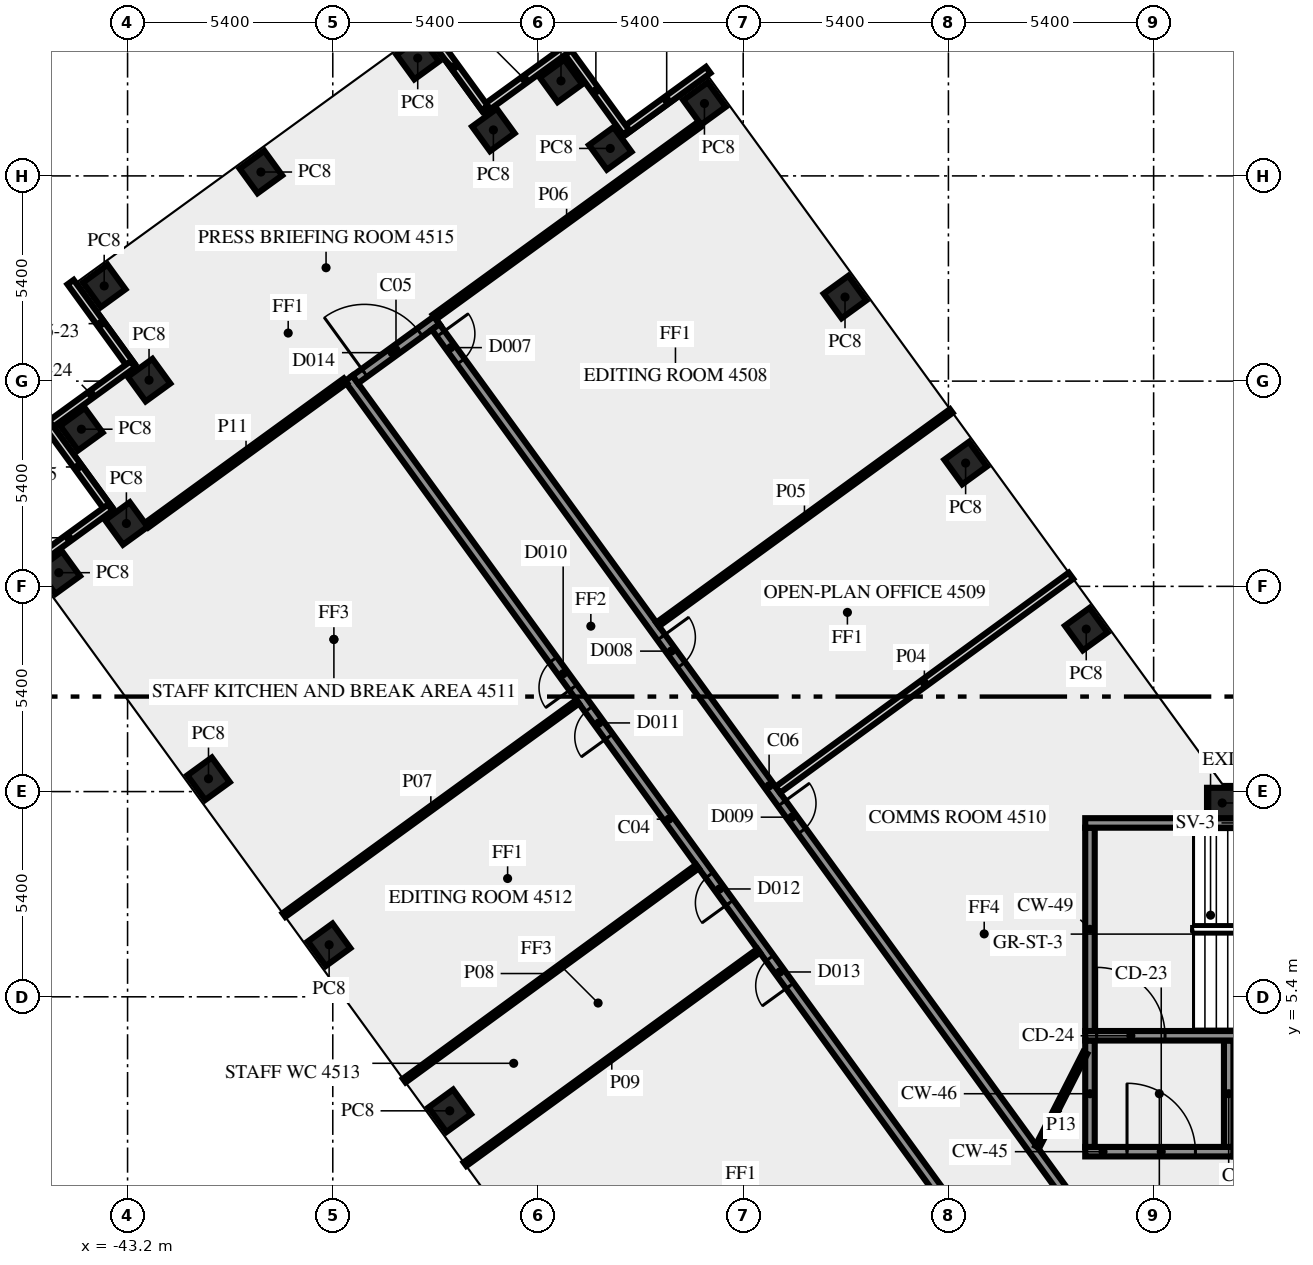
"""IFC4 building model, lengths in metres.
Left out: names, types, materials, properties, quantities, classifications, styles, units other than length and angle.
Written with IfcOpenShell. Run it as: python <this file> out.ifc"""

import sys

from ifc_helpers import new_model, si_unit, direction, frame, frame_2d, origin, origin_2d, place, context, subcontext, project, spatial, rectangle, extrude, element, fill, save


model = new_model("IFC4")
c1 = context("Model", 3, precision=1e-05, world=origin(), true_north=direction((0.0, 1.0)))
c2 = subcontext(c1, "Body", "Model", "MODEL_VIEW")
j1 = project(units=[si_unit("LENGTHUNIT", "METRE"), si_unit("PLANEANGLEUNIT", "RADIAN")], contexts=[c1])
p1 = place(None, origin())
s1 = spatial("IfcSite", under=j1, at=p1, CompositionType="ELEMENT")
p2 = place(p1, origin())
s2 = spatial("IfcBuilding", under=s1, at=p2, CompositionType="ELEMENT")
p3 = place(p2, frame((0.0, 0.0, 194.0)))
s3 = spatial("IfcBuildingStorey", under=s2, at=p3, CompositionType="ELEMENT", Elevation=194.0)
for number, where, z_axis, x_axis in (
    (1, (-17.974, 15.075, 0.0), (0.0, 0.0, 1.0), (-0.588, 0.809, 0.0)),
    (2, (-21.147, 19.444, 0.0), (0.0, 0.0, 1.0), (-0.588, 0.809, 0.0)),
    (3, (-24.321, 23.812, 0.0), (0.0, 0.0, 1.0), (-0.588, 0.809, 0.0)),
    (4, (-28.02, 28.905, 0.0), (0.0, 0.0, 1.0), (-0.809, -0.588, 0.0)),
    (5, (-30.499, 27.723, 0.0), (0.0, 0.0, 1.0), (-0.809, -0.588, 0.0)),
    (6, (-31.795, 29.5, 0.0), (0.0, 0.0, 1.0), (-0.588, 0.809, 0.0)),
    (7, (-33.574, 28.209, 0.0), (0.0, 0.0, 1.0), (-0.588, 0.809, 0.0)),
    (8, (-35.565, 30.1, 0.0), (0.0, 0.0, 1.0), (-0.809, -0.588, 0.0)),
    (9, (-39.691, 27.102, 0.0), (0.0, 0.0, 1.0), (-0.809, -0.588, 0.0)),
    (10, (-43.815, 24.105, 0.0), (0.0, 0.0, 1.0), (-0.809, -0.588, 0.0)),
    (11, (-42.635, 21.626, 0.0), (0.0, 0.0, 1.0), (-0.809, -0.588, 0.0)),
    (12, (-44.415, 20.335, 0.0), (0.0, 0.0, 1.0), (0.588, -0.809, 0.0)),
    (13, (-43.231, 17.854, 0.0), (0.0, 0.0, 1.0), (0.588, -0.809, 0.0)),
    (14, (-45.01, 16.56, 0.0), (0.0, 0.0, 1.0), (0.588, -0.809, 0.0)),
    (15, (-41.07, 11.137, 0.0), (0.0, 0.0, 1.0), (0.588, -0.809, 0.0)),
    (16, (-37.896, 6.769, 0.0), (0.0, 0.0, 1.0), (0.588, -0.809, 0.0)),
    (17, (-34.722, 2.4, 0.0), (0.0, 0.0, 1.0), (0.588, -0.809, 0.0)),
    (18, (-14.395, 10.5, 0.0), (0.0, 0.0, 1.0), (-1.0, 0.0, 0.0)),
):
    element("IfcColumn", number, at=place(p3, frame(where, z_axis=z_axis, x_axis=x_axis)), inside=s3, PredefinedType="COLUMN", context=c2, shape_type="SweptSolid", body=[
        extrude(rectangle(XDim=0.8, YDim=0.8, at=origin_2d()), origin(), (0.0, 0.0, 1.0), 3.65),
    ])
for number, where, z_axis, x_axis in (
    (19, (-27.921, 29.787, 0.0), (0.0, 0.0, 1.0), (-0.809, -0.588, 0.0)),
    (20, (-30.083, 28.149, 0.0), (0.0, 0.0, 1.0), (-0.588, 0.809, 0.0)),
    (21, (-31.654, 30.331, 0.0), (0.0, 0.0, 1.0), (-0.809, -0.588, 0.0)),
    (22, (-33.801, 28.786, 0.0), (0.0, 0.0, 1.0), (-0.588, 0.809, 0.0)),
    (23, (-44.699, 24.205, 0.0), (0.0, 0.0, 1.0), (0.588, -0.809, 0.0)),
    (24, (-43.061, 22.043, 0.0), (0.0, 0.0, 1.0), (-0.809, -0.588, 0.0)),
    (25, (-45.296, 20.434, 0.0), (0.0, 0.0, 1.0), (0.588, -0.809, 0.0)),
    (26, (-43.658, 18.272, 0.0), (0.0, 0.0, 1.0), (-0.809, -0.588, 0.0)),
):
    element("IfcWall", number, at=place(p3, frame(where, z_axis=z_axis, x_axis=x_axis)), inside=s3, PredefinedType="SOLIDWALL", context=c2, shape_type="SweptSolid", body=[
        extrude(rectangle(XDim=2.7, YDim=0.2, at=frame_2d((1.35, 0.0))), origin(), (0.0, 0.0, 1.0), 3.65),
    ])
p4 = place(p3, frame((-18.0, 1.325, 0.0), z_axis=(0.0, 0.0, 1.0), x_axis=(1.0, 0.0, 0.0)))
e27 = element("IfcWall", 27, at=p4, inside=s3, PredefinedType="SHEAR", context=c2, shape_type="SweptSolid", body=[
    extrude(rectangle(XDim=3.9, YDim=0.25, at=frame_2d((1.95, 0.0))), origin(), (0.0, 0.0, 1.0), 3.65),
])
p5 = place(p4, frame((1.1, 0.0, 0.0)))
e28 = element("IfcOpeningElement", 28, at=p5, cuts=e27, PredefinedType="OPENING", context=c2, shape_type="SweptSolid", body=[
    extrude(rectangle(XDim=1.8, YDim=2.1, at=frame_2d((0.9, 1.05))), frame((0.0, 0.135, 0.0), z_axis=(0.0, -1.0, 0.0), x_axis=(1.0, 0.0, 0.0)), (0.0, 0.0, 1.0), 0.27),
])
for number, where, z_axis, x_axis in (
    (29, (-17.875, 1.45, 0.0), (0.0, 0.0, 1.0), (0.0, 1.0, 0.0)),
    (30, (-14.225, 1.45, 0.0), (0.0, 0.0, 1.0), (0.0, 1.0, 0.0)),
):
    element("IfcWall", number, at=place(p3, frame(where, z_axis=z_axis, x_axis=x_axis)), inside=s3, PredefinedType="SHEAR", context=c2, shape_type="SweptSolid", body=[
        extrude(rectangle(XDim=2.8, YDim=0.25, at=frame_2d((1.4, 0.0))), origin(), (0.0, 0.0, 1.0), 3.65),
    ])
p6 = place(p3, frame((-18.0, 4.375, 0.0), z_axis=(0.0, 0.0, 1.0), x_axis=(1.0, 0.0, 0.0)))
e31 = element("IfcWall", 31, at=p6, inside=s3, PredefinedType="SHEAR", context=c2, shape_type="SweptSolid", body=[
    extrude(rectangle(XDim=10.5, YDim=0.25, at=frame_2d((5.25, 0.0))), origin(), (0.0, 0.0, 1.0), 3.65),
])
p7 = place(p6, frame((0.3, 0.0, 0.0)))
e32 = element("IfcOpeningElement", 32, at=p7, cuts=e31, PredefinedType="OPENING", context=c2, shape_type="SweptSolid", body=[
    extrude(rectangle(XDim=1.8, YDim=2.1, at=frame_2d((0.9, 1.05))), frame((0.0, 0.135, 0.0), z_axis=(0.0, -1.0, 0.0), x_axis=(1.0, 0.0, 0.0)), (0.0, 0.0, 1.0), 0.27),
])
p8 = place(p3, frame((-17.875, 4.5, 0.0), z_axis=(0.0, 0.0, 1.0), x_axis=(0.0, 1.0, 0.0)))
e33 = element("IfcWall", 33, at=p8, inside=s3, PredefinedType="SHEAR", context=c2, shape_type="SweptSolid", body=[
    extrude(rectangle(XDim=5.35, YDim=0.25, at=frame_2d((2.675, 0.0))), origin(), (0.0, 0.0, 1.0), 3.65),
])
p9 = place(p3, frame((-18.0, 9.975, 0.0), z_axis=(0.0, 0.0, 1.0), x_axis=(1.0, 0.0, 0.0)))
e34 = element("IfcWall", 34, at=p9, inside=s3, PredefinedType="SHEAR", context=c2, shape_type="SweptSolid", body=[
    extrude(rectangle(XDim=10.5, YDim=0.25, at=frame_2d((5.25, 0.0))), origin(), (0.0, 0.0, 1.0), 3.65),
])
p10 = place(p9, frame((4.5, 0.0, 1.0)))
e35 = element("IfcOpeningElement", 35, at=p10, cuts=e34, PredefinedType="OPENING", context=c2, shape_type="SweptSolid", body=[
    extrude(rectangle(XDim=1.2, YDim=1.2, at=frame_2d((0.6, 0.6))), frame((0.0, 0.135, 0.0), z_axis=(0.0, -1.0, 0.0), x_axis=(1.0, 0.0, 0.0)), (0.0, 0.0, 1.0), 0.27),
])
p11 = place(p3, frame((-20.531, -1.523, 0.0), z_axis=(0.0, 0.0, 1.0), x_axis=(-0.587785812891, 0.809016587076, 0.0)))
e36 = element("IfcWall", 36, at=p11, inside=s3, PredefinedType="SOLIDWALL", context=c2, shape_type="SweptSolid", body=[
    extrude(rectangle(XDim=28.67, YDim=0.25, at=frame_2d((14.335, 0.0))), origin(), (0.0, 0.0, 1.0), 3.65),
])
p12 = place(p11, frame((17.015, 0.0, 0.0)))
e37 = element("IfcOpeningElement", 37, at=p12, cuts=e36, PredefinedType="OPENING", context=c2, shape_type="SweptSolid", body=[
    extrude(rectangle(XDim=0.9, YDim=2.1, at=frame_2d((0.45, 1.05))), frame((0.0, 0.135, 0.0), z_axis=(0.0, -1.0, 0.0), x_axis=(1.0, 0.0, 0.0)), (0.0, 0.0, 1.0), 0.27),
])
p13 = place(p11, frame((8.916, 0.0, 0.0)))
e38 = element("IfcOpeningElement", 38, at=p13, cuts=e36, PredefinedType="OPENING", context=c2, shape_type="SweptSolid", body=[
    extrude(rectangle(XDim=0.9, YDim=2.1, at=frame_2d((0.45, 1.05))), frame((0.0, 0.135, 0.0), z_axis=(0.0, -1.0, 0.0), x_axis=(1.0, 0.0, 0.0)), (0.0, 0.0, 1.0), 0.27),
])
p14 = place(p11, frame((18.616, 0.0, 0.0)))
e39 = element("IfcOpeningElement", 39, at=p14, cuts=e36, PredefinedType="OPENING", context=c2, shape_type="SweptSolid", body=[
    extrude(rectangle(XDim=0.9, YDim=2.1, at=frame_2d((0.45, 1.05))), frame((0.0, 0.135, 0.0), z_axis=(0.0, -1.0, 0.0), x_axis=(1.0, 0.0, 0.0)), (0.0, 0.0, 1.0), 0.27),
])
p15 = place(p11, frame((11.615, 0.0, 0.0)))
e40 = element("IfcOpeningElement", 40, at=p15, cuts=e36, PredefinedType="OPENING", context=c2, shape_type="SweptSolid", body=[
    extrude(rectangle(XDim=0.9, YDim=2.1, at=frame_2d((0.45, 1.05))), frame((0.0, 0.135, 0.0), z_axis=(0.0, -1.0, 0.0), x_axis=(1.0, 0.0, 0.0)), (0.0, 0.0, 1.0), 0.27),
])
p16 = place(p3, frame((-37.208, 21.644, 0.0), z_axis=(0.0, 0.0, 1.0), x_axis=(0.809038743598, 0.587755315891, 0.0)))
e41 = element("IfcWall", 41, at=p16, inside=s3, PredefinedType="SOLIDWALL", context=c2, shape_type="SweptSolid", body=[
    extrude(rectangle(XDim=2.65, YDim=0.25, at=frame_2d((1.325, 0.0))), origin(), (0.0, 0.0, 1.0), 3.65),
])
p17 = place(p16, frame((0.3, 0.0, 0.0)))
e42 = element("IfcOpeningElement", 42, at=p17, cuts=e41, PredefinedType="OPENING", context=c2, shape_type="SweptSolid", body=[
    extrude(rectangle(XDim=1.8, YDim=2.1, at=frame_2d((0.9, 1.05))), frame((0.0, 0.135, 0.0), z_axis=(0.0, -1.0, 0.0), x_axis=(1.0, 0.0, 0.0)), (0.0, 0.0, 1.0), 0.27),
])
p18 = place(p3, frame((-35.092, 23.027, 0.0), z_axis=(0.0, 0.0, 1.0), x_axis=(0.587784076945, -0.809017848313, 0.0)))
e43 = element("IfcWall", 43, at=p18, inside=s3, PredefinedType="SOLIDWALL", context=c2, shape_type="SweptSolid", body=[
    extrude(rectangle(XDim=29.853, YDim=0.25, at=frame_2d((14.927, 0.0))), origin(), (0.0, 0.0, 1.0), 3.65),
])
p19 = place(p18, frame((10.095, 0.0, 0.0)))
e44 = element("IfcOpeningElement", 44, at=p19, cuts=e43, PredefinedType="OPENING", context=c2, shape_type="SweptSolid", body=[
    extrude(rectangle(XDim=0.9, YDim=2.1, at=frame_2d((0.45, 1.05))), frame((0.0, 0.135, 0.0), z_axis=(0.0, -1.0, 0.0), x_axis=(1.0, 0.0, 0.0)), (0.0, 0.0, 1.0), 0.27),
])
p20 = place(p18, frame((15.495, 0.0, 0.0)))
e45 = element("IfcOpeningElement", 45, at=p20, cuts=e43, PredefinedType="OPENING", context=c2, shape_type="SweptSolid", body=[
    extrude(rectangle(XDim=0.9, YDim=2.1, at=frame_2d((0.45, 1.05))), frame((0.0, 0.135, 0.0), z_axis=(0.0, -1.0, 0.0), x_axis=(1.0, 0.0, 0.0)), (0.0, 0.0, 1.0), 0.27),
])
p21 = place(p18, frame((0.224, 0.0, 0.0)))
e46 = element("IfcOpeningElement", 46, at=p21, cuts=e43, PredefinedType="OPENING", context=c2, shape_type="SweptSolid", body=[
    extrude(rectangle(XDim=0.9, YDim=2.1, at=frame_2d((0.45, 1.05))), frame((0.0, 0.135, 0.0), z_axis=(0.0, -1.0, 0.0), x_axis=(1.0, 0.0, 0.0)), (0.0, 0.0, 1.0), 0.27),
])
p22 = place(p3, frame((-26.089, 10.848, 0.0), z_axis=(0.0, 0.0, 1.0), x_axis=(0.807661302092, 0.589646691759, 0.0)))
e47 = element("IfcWall", 47, at=p22, inside=s3, PredefinedType="SOLIDWALL", context=c2, shape_type="SweptSolid", body=[
    extrude(rectangle(XDim=9.55, YDim=0.2, at=frame_2d((4.775, 0.0))), origin(), (0.0, 0.0, 1.0), 2.85),
])
p23 = place(p3, frame((-21.525, 20.813, 0.0), z_axis=(0.0, 0.0, 1.0), x_axis=(-0.808994684961, -0.587815957341, 0.0)))
e48 = element("IfcWall", 48, at=p23, inside=s3, PredefinedType="PARTITIONING", context=c2, shape_type="SweptSolid", body=[
    extrude(rectangle(XDim=9.55, YDim=0.12, at=frame_2d((4.775, 0.0))), origin(), (0.0, 0.0, 1.0), 2.85),
])
p24 = place(p3, frame((-28.168, 28.341, 0.0), z_axis=(0.0, 0.0, 1.0), x_axis=(-0.809030614944, -0.58776650473, 0.0)))
e49 = element("IfcWall", 49, at=p24, inside=s3, PredefinedType="PARTITIONING", context=c2, shape_type="SweptSolid", body=[
    extrude(rectangle(XDim=8.6, YDim=0.15, at=frame_2d((4.3, 0.0))), origin(), (0.0, 0.0, 1.0), 3.65),
])
p25 = place(p3, frame((-31.356, 13.164, 0.0), z_axis=(0.0, 0.0, 1.0), x_axis=(-0.809102944047, -0.587666934526, 0.0)))
e50 = element("IfcWall", 50, at=p25, inside=s3, PredefinedType="PARTITIONING", context=c2, shape_type="SweptSolid", body=[
    extrude(rectangle(XDim=9.55, YDim=0.12, at=frame_2d((4.775, 0.0))), origin(), (0.0, 0.0, 1.0), 2.85),
])
p26 = place(p3, frame((-35.919, 3.197, 0.0), z_axis=(0.0, 0.0, 1.0), x_axis=(0.807645841498, 0.589667868135, 0.0)))
e51 = element("IfcWall", 51, at=p26, inside=s3, PredefinedType="PARTITIONING", context=c2, shape_type="SweptSolid", body=[
    extrude(rectangle(XDim=9.551, YDim=0.12, at=frame_2d((4.775, 0.0))), origin(), (0.0, 0.0, 1.0), 2.85),
])
p27 = place(p3, frame((-26.595, 6.611, 0.0), z_axis=(0.0, 0.0, 1.0), x_axis=(-0.80900684162, -0.587799226107, 0.0)))
e52 = element("IfcWall", 52, at=p27, inside=s3, PredefinedType="PARTITIONING", context=c2, shape_type="SweptSolid", body=[
    extrude(rectangle(XDim=9.55, YDim=0.12, at=frame_2d((4.775, 0.0))), origin(), (0.0, 0.0, 1.0), 2.85),
])
p28 = place(p3, frame((-42.698, 17.81, 0.0), z_axis=(0.0, 0.0, 1.0), x_axis=(0.80901688725, 0.587785399737, 0.0)))
e53 = element("IfcWall", 53, at=p28, inside=s3, PredefinedType="PARTITIONING", context=c2, shape_type="SweptSolid", body=[
    extrude(rectangle(XDim=6.465, YDim=0.15, at=frame_2d((3.232, 0.0))), origin(), (0.0, 0.0, 1.0), 3.65),
])
p29 = place(p3, frame((-19.261, 1.45, 0.0), z_axis=(0.0, 0.0, 1.0), x_axis=(0.453950796792, 0.891026752736, 0.0)))
e54 = element("IfcWall", 54, at=p29, inside=s3, PredefinedType="PARTITIONING", context=c2, shape_type="SweptSolid", body=[
    extrude(rectangle(XDim=2.778, YDim=0.12, at=frame_2d((1.389, 0.0))), origin(), (0.0, 0.0, 1.0), 3.65),
])
p30 = place(p5, origin())
e55 = element("IfcDoor", 55, at=p30, inside=s3, OperationType="DOUBLE_DOOR_SINGLE_SWING", PredefinedType="DOOR", context=c2, shape_type="SweptSolid", body=[
    extrude(rectangle(XDim=1.8, YDim=2.1, at=frame_2d((0.9, 1.05))), frame((0.0, 0.025, 0.0), z_axis=(0.0, -1.0, 0.0), x_axis=(1.0, 0.0, 0.0)), (0.0, 0.0, 1.0), 0.05),
])
fill(e28, e55)
p31 = place(p7, origin())
e56 = element("IfcDoor", 56, at=p31, inside=s3, OperationType="DOUBLE_DOOR_SINGLE_SWING", PredefinedType="DOOR", context=c2, shape_type="SweptSolid", body=[
    extrude(rectangle(XDim=1.8, YDim=2.1, at=frame_2d((0.9, 1.05))), frame((0.0, 0.025, 0.0), z_axis=(0.0, -1.0, 0.0), x_axis=(1.0, 0.0, 0.0)), (0.0, 0.0, 1.0), 0.05),
])
fill(e32, e56)
p32 = place(p19, origin())
e57 = element("IfcDoor", 57, at=p32, inside=s3, OperationType="SINGLE_SWING_LEFT", PredefinedType="DOOR", context=c2, shape_type="SweptSolid", body=[
    extrude(rectangle(XDim=0.9, YDim=2.1, at=frame_2d((0.45, 1.05))), frame((0.0, 0.025, 0.0), z_axis=(0.0, -1.0, 0.0), x_axis=(1.0, 0.0, 0.0)), (0.0, 0.0, 1.0), 0.05),
])
fill(e44, e57)
p33 = place(p20, origin())
e58 = element("IfcDoor", 58, at=p33, inside=s3, OperationType="SINGLE_SWING_LEFT", PredefinedType="DOOR", context=c2, shape_type="SweptSolid", body=[
    extrude(rectangle(XDim=0.9, YDim=2.1, at=frame_2d((0.45, 1.05))), frame((0.0, 0.025, 0.0), z_axis=(0.0, -1.0, 0.0), x_axis=(1.0, 0.0, 0.0)), (0.0, 0.0, 1.0), 0.05),
])
fill(e45, e58)
p34 = place(p21, origin())
e59 = element("IfcDoor", 59, at=p34, inside=s3, OperationType="SINGLE_SWING_LEFT", PredefinedType="DOOR", context=c2, shape_type="SweptSolid", body=[
    extrude(rectangle(XDim=0.9, YDim=2.1, at=frame_2d((0.45, 1.05))), frame((0.0, 0.025, 0.0), z_axis=(0.0, -1.0, 0.0), x_axis=(1.0, 0.0, 0.0)), (0.0, 0.0, 1.0), 0.05),
])
fill(e46, e59)
p35 = place(p12, origin())
e60 = element("IfcDoor", 60, at=p35, inside=s3, OperationType="SINGLE_SWING_RIGHT", PredefinedType="DOOR", context=c2, shape_type="SweptSolid", body=[
    extrude(rectangle(XDim=0.9, YDim=2.1, at=frame_2d((0.45, 1.05))), frame((0.0, 0.025, 0.0), z_axis=(0.0, -1.0, 0.0), x_axis=(1.0, 0.0, 0.0)), (0.0, 0.0, 1.0), 0.05),
])
fill(e37, e60)
p36 = place(p13, origin())
e61 = element("IfcDoor", 61, at=p36, inside=s3, OperationType="SINGLE_SWING_RIGHT", PredefinedType="DOOR", context=c2, shape_type="SweptSolid", body=[
    extrude(rectangle(XDim=0.9, YDim=2.1, at=frame_2d((0.45, 1.05))), frame((0.0, 0.025, 0.0), z_axis=(0.0, -1.0, 0.0), x_axis=(1.0, 0.0, 0.0)), (0.0, 0.0, 1.0), 0.05),
])
fill(e38, e61)
p37 = place(p17, origin())
e62 = element("IfcDoor", 62, at=p37, inside=s3, OperationType="DOUBLE_DOOR_SINGLE_SWING", PredefinedType="DOOR", context=c2, shape_type="SweptSolid", body=[
    extrude(rectangle(XDim=1.8, YDim=2.1, at=frame_2d((0.9, 1.05))), frame((0.0, 0.025, 0.0), z_axis=(0.0, -1.0, 0.0), x_axis=(1.0, 0.0, 0.0)), (0.0, 0.0, 1.0), 0.05),
])
fill(e42, e62)
p38 = place(p14, origin())
e63 = element("IfcDoor", 63, at=p38, inside=s3, OperationType="SINGLE_SWING_LEFT", PredefinedType="DOOR", context=c2, shape_type="SweptSolid", body=[
    extrude(rectangle(XDim=0.9, YDim=2.1, at=frame_2d((0.45, 1.05))), frame((0.0, 0.025, 0.0), z_axis=(0.0, -1.0, 0.0), x_axis=(1.0, 0.0, 0.0)), (0.0, 0.0, 1.0), 0.05),
])
fill(e39, e63)
p39 = place(p15, origin())
e64 = element("IfcDoor", 64, at=p39, inside=s3, OperationType="SINGLE_SWING_RIGHT", PredefinedType="DOOR", context=c2, shape_type="SweptSolid", body=[
    extrude(rectangle(XDim=0.9, YDim=2.1, at=frame_2d((0.45, 1.05))), frame((0.0, 0.025, 0.0), z_axis=(0.0, -1.0, 0.0), x_axis=(1.0, 0.0, 0.0)), (0.0, 0.0, 1.0), 0.05),
])
fill(e40, e64)
save(model, sys.argv[1])
